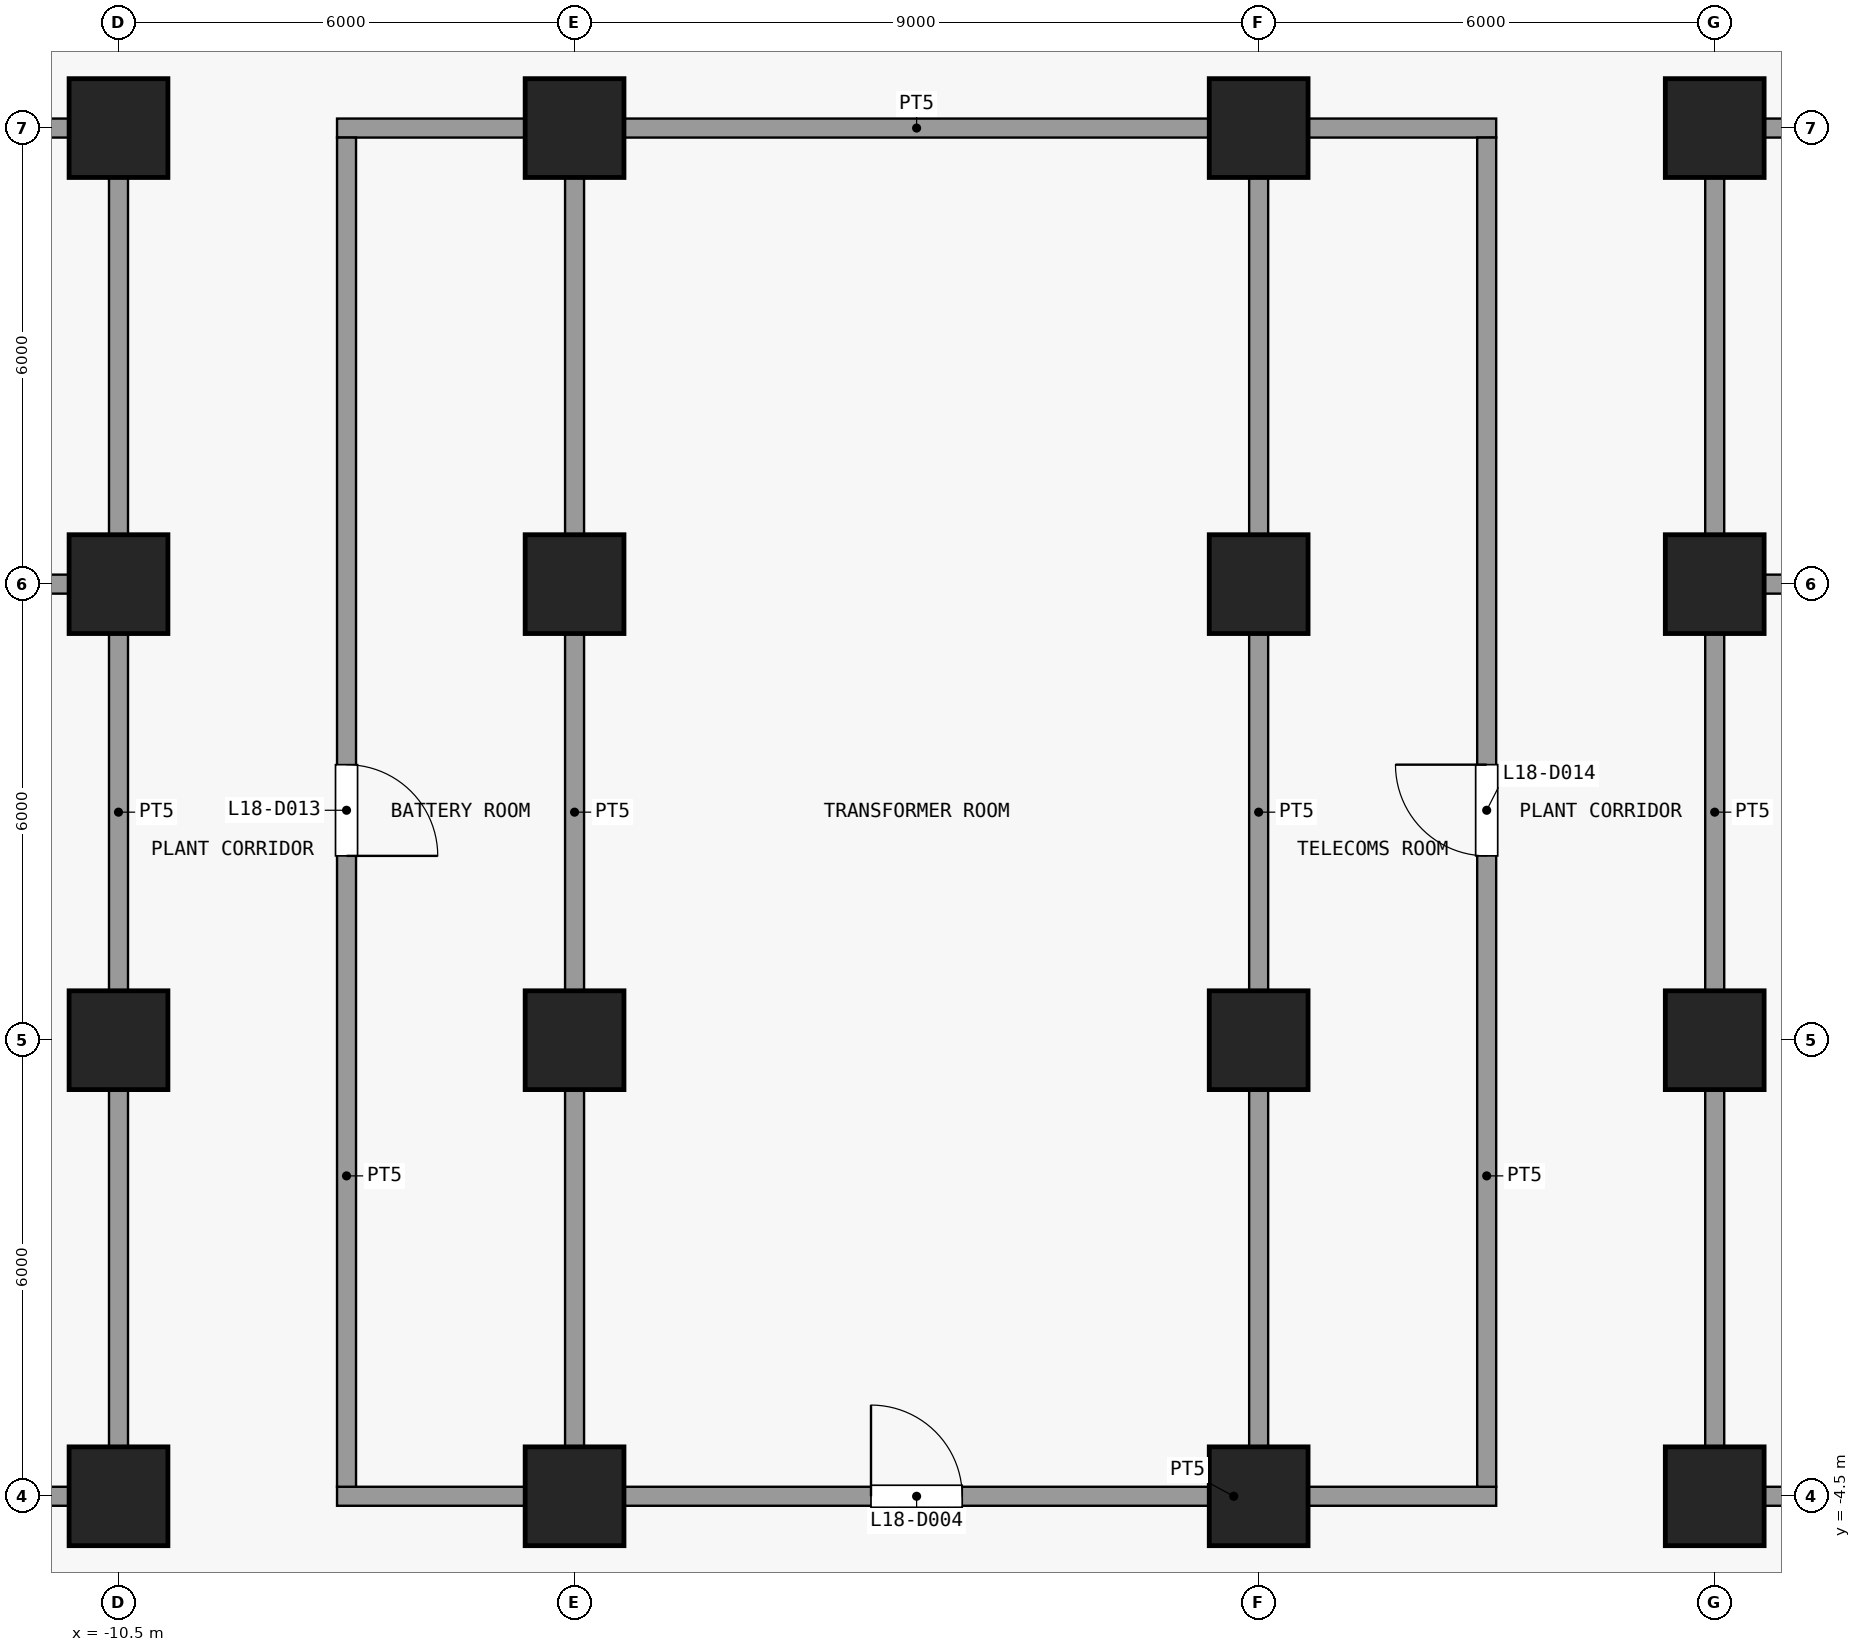
"""IFC4 building model, lengths in metres.
Left out: names, types, materials, properties, quantities, classifications, styles, units other than length and angle.
Written with IfcOpenShell. Run it as: python <this file> out.ifc"""

import sys

from ifc_helpers import new_model, si_unit, direction, frame, frame_2d, origin, origin_2d, place, context, subcontext, project, spatial, rectangle, extrude, element, fill, save


model = new_model("IFC4")
c1 = context("Model", 3, precision=1e-05, world=origin(), true_north=direction((0.0, 1.0)))
c2 = subcontext(c1, "Body", "Model", "MODEL_VIEW")
j1 = project(units=[si_unit("LENGTHUNIT", "METRE"), si_unit("PLANEANGLEUNIT", "RADIAN")], contexts=[c1])
p1 = place(None, origin())
s1 = spatial("IfcSite", under=j1, at=p1, CompositionType="ELEMENT")
p2 = place(p1, origin())
s2 = spatial("IfcBuilding", under=s1, at=p2, CompositionType="ELEMENT")
p3 = place(p2, frame((0.0, 0.0, 75.7)))
s3 = spatial("IfcBuildingStorey", under=s2, at=p3, CompositionType="ELEMENT", Elevation=75.7)
for number, where, z_axis, x_axis in (
    (1, (-10.5, -4.5, 0.0), (0.0, 0.0, 1.0), (1.0, 0.0, 0.0)),
    (2, (-10.5, 1.5, 0.0), (0.0, 0.0, 1.0), (1.0, 0.0, 0.0)),
    (3, (-10.5, 7.5, 0.0), (0.0, 0.0, 1.0), (1.0, 0.0, 0.0)),
    (4, (-10.5, 13.5, 0.0), (0.0, 0.0, 1.0), (1.0, 0.0, 0.0)),
    (5, (-4.5, -4.5, 0.0), (0.0, 0.0, 1.0), (1.0, 0.0, 0.0)),
    (6, (-4.5, 1.5, 0.0), (0.0, 0.0, 1.0), (1.0, 0.0, 0.0)),
    (7, (-4.5, 7.5, 0.0), (0.0, 0.0, 1.0), (1.0, 0.0, 0.0)),
    (8, (-4.5, 13.5, 0.0), (0.0, 0.0, 1.0), (1.0, 0.0, 0.0)),
    (9, (4.5, -4.5, 0.0), (0.0, 0.0, 1.0), (1.0, 0.0, 0.0)),
    (10, (4.5, 1.5, 0.0), (0.0, 0.0, 1.0), (1.0, 0.0, 0.0)),
    (11, (4.5, 7.5, 0.0), (0.0, 0.0, 1.0), (1.0, 0.0, 0.0)),
    (12, (4.5, 13.5, 0.0), (0.0, 0.0, 1.0), (1.0, 0.0, 0.0)),
    (13, (10.5, -4.5, 0.0), (0.0, 0.0, 1.0), (1.0, 0.0, 0.0)),
    (14, (10.5, 1.5, 0.0), (0.0, 0.0, 1.0), (1.0, 0.0, 0.0)),
    (15, (10.5, 7.5, 0.0), (0.0, 0.0, 1.0), (1.0, 0.0, 0.0)),
    (16, (10.5, 13.5, 0.0), (0.0, 0.0, 1.0), (1.0, 0.0, 0.0)),
):
    element("IfcColumn", number, at=place(p3, frame(where, z_axis=z_axis, x_axis=x_axis)), inside=s3, PredefinedType="COLUMN", context=c2, shape_type="SweptSolid", body=[
        extrude(rectangle(XDim=1.3, YDim=1.3, at=origin_2d()), origin(), (0.0, 0.0, 1.0), 5.4),
    ])
p4 = place(p3, frame((-25.35, -4.5, 0.0), z_axis=(0.0, 0.0, 1.0), x_axis=(1.0, 0.0, 0.0)))
e17 = element("IfcWall", 17, at=p4, inside=s3, PredefinedType="PARTITIONING", context=c2, shape_type="SweptSolid", body=[
    extrude(rectangle(XDim=14.975, YDim=0.25, at=frame_2d((7.488, 0.0))), origin(), (0.0, 0.0, 1.0), 5.0),
])
p5 = place(p4, frame((6.7, 0.0, 0.0)))
e18 = element("IfcOpeningElement", 18, at=p5, cuts=e17, PredefinedType="OPENING", context=c2, shape_type="SweptSolid", body=[
    extrude(rectangle(XDim=1.2, YDim=2.1, at=frame_2d((0.6, 1.05))), frame((0.0, 0.135, 0.0), z_axis=(0.0, -1.0, 0.0), x_axis=(1.0, 0.0, 0.0)), (0.0, 0.0, 1.0), 0.27),
])
p6 = place(p3, frame((-7.625, -4.5, 0.0), z_axis=(0.0, 0.0, 1.0), x_axis=(1.0, 0.0, 0.0)))
e19 = element("IfcWall", 19, at=p6, inside=s3, PredefinedType="PARTITIONING", context=c2, shape_type="SweptSolid", body=[
    extrude(rectangle(XDim=15.25, YDim=0.25, at=frame_2d((7.625, 0.0))), origin(), (0.0, 0.0, 1.0), 5.0),
])
p7 = place(p6, frame((7.025, 0.0, 0.0)))
e20 = element("IfcOpeningElement", 20, at=p7, cuts=e19, PredefinedType="OPENING", context=c2, shape_type="SweptSolid", body=[
    extrude(rectangle(XDim=1.2, YDim=2.1, at=frame_2d((0.6, 1.05))), frame((0.0, 0.135, 0.0), z_axis=(0.0, -1.0, 0.0), x_axis=(1.0, 0.0, 0.0)), (0.0, 0.0, 1.0), 0.27),
])
p8 = place(p3, frame((10.375, -4.5, 0.0), z_axis=(0.0, 0.0, 1.0), x_axis=(1.0, 0.0, 0.0)))
e21 = element("IfcWall", 21, at=p8, inside=s3, PredefinedType="PARTITIONING", context=c2, shape_type="SweptSolid", body=[
    extrude(rectangle(XDim=14.975, YDim=0.25, at=frame_2d((7.488, 0.0))), origin(), (0.0, 0.0, 1.0), 5.0),
])
p9 = place(p8, frame((7.0, 0.0, 0.0)))
e22 = element("IfcOpeningElement", 22, at=p9, cuts=e21, PredefinedType="OPENING", context=c2, shape_type="SweptSolid", body=[
    extrude(rectangle(XDim=1.2, YDim=2.1, at=frame_2d((0.6, 1.05))), frame((0.0, 0.135, 0.0), z_axis=(0.0, -1.0, 0.0), x_axis=(1.0, 0.0, 0.0)), (0.0, 0.0, 1.0), 0.27),
])
for number, where, z_axis, x_axis in (
    (23, (-25.35, 7.5, 0.0), (0.0, 0.0, 1.0), (1.0, 0.0, 0.0)),
    (24, (10.625, 7.5, 0.0), (0.0, 0.0, 1.0), (1.0, 0.0, 0.0)),
):
    element("IfcWall", number, at=place(p3, frame(where, z_axis=z_axis, x_axis=x_axis)), inside=s3, PredefinedType="PARTITIONING", context=c2, shape_type="SweptSolid", body=[
        extrude(rectangle(XDim=14.725, YDim=0.25, at=frame_2d((7.363, 0.0))), origin(), (0.0, 0.0, 1.0), 5.0),
    ])
p10 = place(p3, frame((-25.35, 13.5, 0.0), z_axis=(0.0, 0.0, 1.0), x_axis=(1.0, 0.0, 0.0)))
e25 = element("IfcWall", 25, at=p10, inside=s3, PredefinedType="PARTITIONING", context=c2, shape_type="SweptSolid", body=[
    extrude(rectangle(XDim=14.975, YDim=0.25, at=frame_2d((7.488, 0.0))), origin(), (0.0, 0.0, 1.0), 5.0),
])
p11 = place(p10, frame((6.9, 0.0, 0.0)))
e26 = element("IfcOpeningElement", 26, at=p11, cuts=e25, PredefinedType="OPENING", context=c2, shape_type="SweptSolid", body=[
    extrude(rectangle(XDim=1.2, YDim=2.1, at=frame_2d((0.6, 1.05))), frame((0.0, 0.135, 0.0), z_axis=(0.0, -1.0, 0.0), x_axis=(1.0, 0.0, 0.0)), (0.0, 0.0, 1.0), 0.27),
])
p12 = place(p3, frame((-7.625, 13.5, 0.0), z_axis=(0.0, 0.0, 1.0), x_axis=(1.0, 0.0, 0.0)))
e27 = element("IfcWall", 27, at=p12, inside=s3, PredefinedType="PARTITIONING", context=c2, shape_type="SweptSolid", body=[
    extrude(rectangle(XDim=15.25, YDim=0.25, at=frame_2d((7.625, 0.0))), origin(), (0.0, 0.0, 1.0), 5.0),
])
p13 = place(p3, frame((10.375, 13.5, 0.0), z_axis=(0.0, 0.0, 1.0), x_axis=(1.0, 0.0, 0.0)))
e28 = element("IfcWall", 28, at=p13, inside=s3, PredefinedType="PARTITIONING", context=c2, shape_type="SweptSolid", body=[
    extrude(rectangle(XDim=14.975, YDim=0.25, at=frame_2d((7.488, 0.0))), origin(), (0.0, 0.0, 1.0), 5.0),
])
p14 = place(p13, frame((6.9, 0.0, 0.0)))
e29 = element("IfcOpeningElement", 29, at=p14, cuts=e28, PredefinedType="OPENING", context=c2, shape_type="SweptSolid", body=[
    extrude(rectangle(XDim=1.2, YDim=2.1, at=frame_2d((0.6, 1.05))), frame((0.0, 0.135, 0.0), z_axis=(0.0, -1.0, 0.0), x_axis=(1.0, 0.0, 0.0)), (0.0, 0.0, 1.0), 0.27),
])
p15 = place(p3, frame((-10.5, -4.375, 0.0), z_axis=(0.0, 0.0, 1.0), x_axis=(0.0, 1.0, 0.0)))
e30 = element("IfcWall", 30, at=p15, inside=s3, PredefinedType="PARTITIONING", context=c2, shape_type="SweptSolid", body=[
    extrude(rectangle(XDim=17.75, YDim=0.25, at=frame_2d((8.875, 0.0))), origin(), (0.0, 0.0, 1.0), 5.0),
])
p16 = place(p3, frame((-7.5, -4.375, 0.0), z_axis=(0.0, 0.0, 1.0), x_axis=(0.0, 1.0, 0.0)))
e31 = element("IfcWall", 31, at=p16, inside=s3, PredefinedType="PARTITIONING", context=c2, shape_type="SweptSolid", body=[
    extrude(rectangle(XDim=17.75, YDim=0.25, at=frame_2d((8.875, 0.0))), origin(), (0.0, 0.0, 1.0), 5.0),
])
p17 = place(p16, frame((8.3, 0.0, 0.0)))
e32 = element("IfcOpeningElement", 32, at=p17, cuts=e31, PredefinedType="OPENING", context=c2, shape_type="SweptSolid", body=[
    extrude(rectangle(XDim=1.2, YDim=2.1, at=frame_2d((0.6, 1.05))), frame((0.0, 0.135, 0.0), z_axis=(0.0, -1.0, 0.0), x_axis=(1.0, 0.0, 0.0)), (0.0, 0.0, 1.0), 0.27),
])
for number, where, z_axis, x_axis in (
    (33, (-4.5, -4.375, 0.0), (0.0, 0.0, 1.0), (0.0, 1.0, 0.0)),
    (34, (4.5, -4.375, 0.0), (0.0, 0.0, 1.0), (0.0, 1.0, 0.0)),
):
    element("IfcWall", number, at=place(p3, frame(where, z_axis=z_axis, x_axis=x_axis)), inside=s3, PredefinedType="PARTITIONING", context=c2, shape_type="SweptSolid", body=[
        extrude(rectangle(XDim=17.75, YDim=0.25, at=frame_2d((8.875, 0.0))), origin(), (0.0, 0.0, 1.0), 5.0),
    ])
p18 = place(p3, frame((7.5, -4.375, 0.0), z_axis=(0.0, 0.0, 1.0), x_axis=(0.0, 1.0, 0.0)))
e35 = element("IfcWall", 35, at=p18, inside=s3, PredefinedType="PARTITIONING", context=c2, shape_type="SweptSolid", body=[
    extrude(rectangle(XDim=17.75, YDim=0.25, at=frame_2d((8.875, 0.0))), origin(), (0.0, 0.0, 1.0), 5.0),
])
p19 = place(p18, frame((8.3, 0.0, 0.0)))
e36 = element("IfcOpeningElement", 36, at=p19, cuts=e35, PredefinedType="OPENING", context=c2, shape_type="SweptSolid", body=[
    extrude(rectangle(XDim=1.2, YDim=2.1, at=frame_2d((0.6, 1.05))), frame((0.0, 0.135, 0.0), z_axis=(0.0, -1.0, 0.0), x_axis=(1.0, 0.0, 0.0)), (0.0, 0.0, 1.0), 0.27),
])
p20 = place(p3, frame((10.5, -4.375, 0.0), z_axis=(0.0, 0.0, 1.0), x_axis=(0.0, 1.0, 0.0)))
e37 = element("IfcWall", 37, at=p20, inside=s3, PredefinedType="PARTITIONING", context=c2, shape_type="SweptSolid", body=[
    extrude(rectangle(XDim=17.75, YDim=0.25, at=frame_2d((8.875, 0.0))), origin(), (0.0, 0.0, 1.0), 5.0),
])
p21 = place(p7, origin())
e38 = element("IfcDoor", 38, at=p21, inside=s3, OperationType="SINGLE_SWING_RIGHT", PredefinedType="DOOR", context=c2, shape_type="SweptSolid", body=[
    extrude(rectangle(XDim=1.2, YDim=2.1, at=frame_2d((0.6, 1.05))), frame((0.0, 0.025, 0.0), z_axis=(0.0, -1.0, 0.0), x_axis=(1.0, 0.0, 0.0)), (0.0, 0.0, 1.0), 0.05),
])
fill(e20, e38)
p22 = place(p17, origin())
e39 = element("IfcDoor", 39, at=p22, inside=s3, OperationType="SINGLE_SWING_LEFT", PredefinedType="DOOR", context=c2, shape_type="SweptSolid", body=[
    extrude(rectangle(XDim=1.2, YDim=2.1, at=frame_2d((0.6, 1.05))), frame((0.0, 0.025, 0.0), z_axis=(0.0, -1.0, 0.0), x_axis=(1.0, 0.0, 0.0)), (0.0, 0.0, 1.0), 0.05),
])
fill(e32, e39)
p23 = place(p19, origin())
e40 = element("IfcDoor", 40, at=p23, inside=s3, OperationType="SINGLE_SWING_LEFT", PredefinedType="DOOR", context=c2, shape_type="SweptSolid", body=[
    extrude(rectangle(XDim=1.2, YDim=2.1, at=frame_2d((0.6, 1.05))), frame((0.0, 0.025, 0.0), z_axis=(0.0, -1.0, 0.0), x_axis=(1.0, 0.0, 0.0)), (0.0, 0.0, 1.0), 0.05),
])
fill(e36, e40)
save(model, sys.argv[1])
